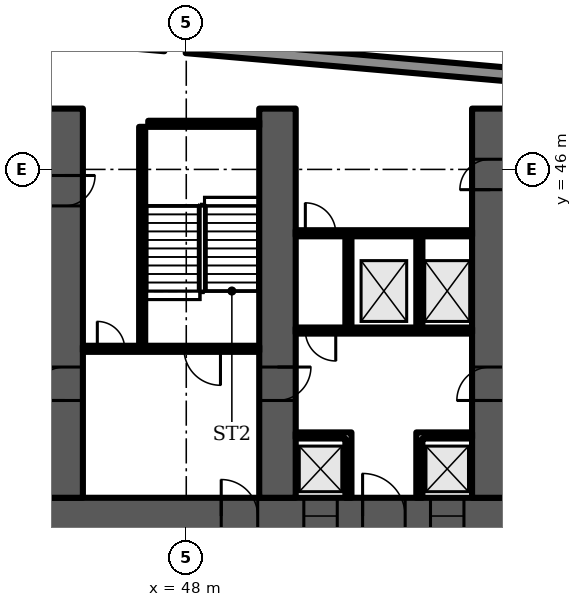
"""IFC4 building model, lengths in metres.
Left out: names, types, materials, properties, quantities, classifications, styles, units other than length and angle.
Written with IfcOpenShell. Run it as: python <this file> out.ifc"""

import sys

from ifc_helpers import new_model, si_unit, direction, frame, frame_2d, origin, place, context, subcontext, project, spatial, polyline, rectangle, outline, extrude, element, fill, save


model = new_model("IFC4")
c1 = context("Model", 3, precision=1e-05, world=origin(), true_north=direction((0.0, 1.0)))
c2 = subcontext(c1, "Body", "Model", "MODEL_VIEW")
j1 = project(units=[si_unit("LENGTHUNIT", "METRE"), si_unit("PLANEANGLEUNIT", "RADIAN")], contexts=[c1])
p1 = place(None, origin())
s1 = spatial("IfcSite", under=j1, at=p1, CompositionType="ELEMENT")
p2 = place(p1, origin())
s2 = spatial("IfcBuilding", under=s1, at=p2, CompositionType="ELEMENT")
p3 = place(p2, origin())
s3 = spatial("IfcBuildingStorey", under=s2, at=p3, CompositionType="ELEMENT", Elevation=0.0)
p4 = place(p3, frame((59.301, 49.06, 0.0), z_axis=(0.0, 0.0, 1.0), x_axis=(-0.996195, 0.087145, 0.0)))
e1 = element("IfcWall", 1, at=p4, inside=s3, PredefinedType="SOLIDWALL", context=c2, shape_type="SweptSolid", body=[
    extrude(rectangle(XDim=11.344, YDim=0.45, at=frame_2d((5.672, 0.0))), origin(), (0.0, 0.0, 1.0), 7.7),
])
p5 = place(p3, frame((9.0, 34.6, 0.0), z_axis=(0.0, 0.0, 1.0), x_axis=(1.0, 0.0, 0.0)))
e2 = element("IfcWall", 2, at=p5, inside=s3, PredefinedType="SHEAR", context=c2, shape_type="SweptSolid", body=[
    extrude(rectangle(XDim=56.0, YDim=1.2, at=frame_2d((28.0, 0.0))), origin(), (0.0, 0.0, 1.0), 7.7),
])
p6 = place(p5, frame((3.3, 0.0, 0.0)))
e3 = element("IfcOpeningElement", 3, at=p6, cuts=e2, PredefinedType="OPENING", context=c2, shape_type="SweptSolid", body=[
    extrude(rectangle(XDim=1.0, YDim=2.1, at=frame_2d((0.5, 1.05))), frame((0.0, 0.61, 0.0), z_axis=(0.0, -1.0, 0.0), x_axis=(1.0, 0.0, 0.0)), (0.0, 0.0, 1.0), 1.22),
])
p7 = place(p5, frame((7.867, 0.0, 0.0)))
e4 = element("IfcOpeningElement", 4, at=p7, cuts=e2, PredefinedType="OPENING", context=c2, shape_type="SweptSolid", body=[
    extrude(rectangle(XDim=1.1, YDim=2.1, at=frame_2d((0.55, 1.05))), frame((0.0, 0.61, 0.0), z_axis=(0.0, -1.0, 0.0), x_axis=(1.0, 0.0, 0.0)), (0.0, 0.0, 1.0), 1.22),
])
p8 = place(p5, frame((12.033, 0.0, 0.0)))
e5 = element("IfcOpeningElement", 5, at=p8, cuts=e2, PredefinedType="OPENING", context=c2, shape_type="SweptSolid", body=[
    extrude(rectangle(XDim=1.1, YDim=2.1, at=frame_2d((0.55, 1.05))), frame((0.0, 0.61, 0.0), z_axis=(0.0, -1.0, 0.0), x_axis=(1.0, 0.0, 0.0)), (0.0, 0.0, 1.0), 1.22),
])
p9 = place(p5, frame((9.8, 0.0, 0.0)))
e6 = element("IfcOpeningElement", 6, at=p9, cuts=e2, PredefinedType="OPENING", context=c2, shape_type="SweptSolid", body=[
    extrude(rectangle(XDim=1.4, YDim=2.1, at=frame_2d((0.7, 1.05))), frame((0.0, 0.61, 0.0), z_axis=(0.0, -1.0, 0.0), x_axis=(1.0, 0.0, 0.0)), (0.0, 0.0, 1.0), 1.22),
])
p10 = place(p5, frame((14.65, 0.0, 0.0)))
e7 = element("IfcOpeningElement", 7, at=p10, cuts=e2, PredefinedType="OPENING", context=c2, shape_type="SweptSolid", body=[
    extrude(rectangle(XDim=1.2, YDim=2.1, at=frame_2d((0.6, 1.05))), frame((0.0, 0.61, 0.0), z_axis=(0.0, -1.0, 0.0), x_axis=(1.0, 0.0, 0.0)), (0.0, 0.0, 1.0), 1.22),
])
p11 = place(p5, frame((21.867, 0.0, 0.0)))
e8 = element("IfcOpeningElement", 8, at=p11, cuts=e2, PredefinedType="OPENING", context=c2, shape_type="SweptSolid", body=[
    extrude(rectangle(XDim=1.1, YDim=2.1, at=frame_2d((0.55, 1.05))), frame((0.0, 0.61, 0.0), z_axis=(0.0, -1.0, 0.0), x_axis=(1.0, 0.0, 0.0)), (0.0, 0.0, 1.0), 1.22),
])
p12 = place(p5, frame((26.033, 0.0, 0.0)))
e9 = element("IfcOpeningElement", 9, at=p12, cuts=e2, PredefinedType="OPENING", context=c2, shape_type="SweptSolid", body=[
    extrude(rectangle(XDim=1.1, YDim=2.1, at=frame_2d((0.55, 1.05))), frame((0.0, 0.61, 0.0), z_axis=(0.0, -1.0, 0.0), x_axis=(1.0, 0.0, 0.0)), (0.0, 0.0, 1.0), 1.22),
])
p13 = place(p5, frame((23.8, 0.0, 0.0)))
e10 = element("IfcOpeningElement", 10, at=p13, cuts=e2, PredefinedType="OPENING", context=c2, shape_type="SweptSolid", body=[
    extrude(rectangle(XDim=1.4, YDim=2.1, at=frame_2d((0.7, 1.05))), frame((0.0, 0.61, 0.0), z_axis=(0.0, -1.0, 0.0), x_axis=(1.0, 0.0, 0.0)), (0.0, 0.0, 1.0), 1.22),
])
p14 = place(p5, frame((28.867, 0.0, 0.0)))
e11 = element("IfcOpeningElement", 11, at=p14, cuts=e2, PredefinedType="OPENING", context=c2, shape_type="SweptSolid", body=[
    extrude(rectangle(XDim=1.1, YDim=2.1, at=frame_2d((0.55, 1.05))), frame((0.0, 0.61, 0.0), z_axis=(0.0, -1.0, 0.0), x_axis=(1.0, 0.0, 0.0)), (0.0, 0.0, 1.0), 1.22),
])
p15 = place(p5, frame((33.033, 0.0, 0.0)))
e12 = element("IfcOpeningElement", 12, at=p15, cuts=e2, PredefinedType="OPENING", context=c2, shape_type="SweptSolid", body=[
    extrude(rectangle(XDim=1.1, YDim=2.1, at=frame_2d((0.55, 1.05))), frame((0.0, 0.61, 0.0), z_axis=(0.0, -1.0, 0.0), x_axis=(1.0, 0.0, 0.0)), (0.0, 0.0, 1.0), 1.22),
])
p16 = place(p5, frame((40.15, 0.0, 0.0)))
e13 = element("IfcOpeningElement", 13, at=p16, cuts=e2, PredefinedType="OPENING", context=c2, shape_type="SweptSolid", body=[
    extrude(rectangle(XDim=1.2, YDim=2.1, at=frame_2d((0.6, 1.05))), frame((0.0, 0.61, 0.0), z_axis=(0.0, -1.0, 0.0), x_axis=(1.0, 0.0, 0.0)), (0.0, 0.0, 1.0), 1.22),
])
p17 = place(p5, frame((42.867, 0.0, 0.0)))
e14 = element("IfcOpeningElement", 14, at=p17, cuts=e2, PredefinedType="OPENING", context=c2, shape_type="SweptSolid", body=[
    extrude(rectangle(XDim=1.1, YDim=2.1, at=frame_2d((0.55, 1.05))), frame((0.0, 0.61, 0.0), z_axis=(0.0, -1.0, 0.0), x_axis=(1.0, 0.0, 0.0)), (0.0, 0.0, 1.0), 1.22),
])
p18 = place(p5, frame((47.033, 0.0, 0.0)))
e15 = element("IfcOpeningElement", 15, at=p18, cuts=e2, PredefinedType="OPENING", context=c2, shape_type="SweptSolid", body=[
    extrude(rectangle(XDim=1.1, YDim=2.1, at=frame_2d((0.55, 1.05))), frame((0.0, 0.61, 0.0), z_axis=(0.0, -1.0, 0.0), x_axis=(1.0, 0.0, 0.0)), (0.0, 0.0, 1.0), 1.22),
])
p19 = place(p5, frame((44.8, 0.0, 0.0)))
e16 = element("IfcOpeningElement", 16, at=p19, cuts=e2, PredefinedType="OPENING", context=c2, shape_type="SweptSolid", body=[
    extrude(rectangle(XDim=1.4, YDim=2.1, at=frame_2d((0.7, 1.05))), frame((0.0, 0.61, 0.0), z_axis=(0.0, -1.0, 0.0), x_axis=(1.0, 0.0, 0.0)), (0.0, 0.0, 1.0), 1.22),
])
p20 = place(p5, frame((49.867, 0.0, 0.0)))
e17 = element("IfcOpeningElement", 17, at=p20, cuts=e2, PredefinedType="OPENING", context=c2, shape_type="SweptSolid", body=[
    extrude(rectangle(XDim=1.1, YDim=2.1, at=frame_2d((0.55, 1.05))), frame((0.0, 0.61, 0.0), z_axis=(0.0, -1.0, 0.0), x_axis=(1.0, 0.0, 0.0)), (0.0, 0.0, 1.0), 1.22),
])
p21 = place(p5, frame((53.5, 0.0, 0.0)))
e18 = element("IfcOpeningElement", 18, at=p21, cuts=e2, PredefinedType="OPENING", context=c2, shape_type="SweptSolid", body=[
    extrude(rectangle(XDim=1.1, YDim=2.1, at=frame_2d((0.55, 1.05))), frame((0.0, 0.61, 0.0), z_axis=(0.0, -1.0, 0.0), x_axis=(1.0, 0.0, 0.0)), (0.0, 0.0, 1.0), 1.22),
])
p22 = place(p5, frame((51.567, 0.0, 0.0)))
e19 = element("IfcOpeningElement", 19, at=p22, cuts=e2, PredefinedType="OPENING", context=c2, shape_type="SweptSolid", body=[
    extrude(rectangle(XDim=1.4, YDim=2.1, at=frame_2d((0.7, 1.05))), frame((0.0, 0.61, 0.0), z_axis=(0.0, -1.0, 0.0), x_axis=(1.0, 0.0, 0.0)), (0.0, 0.0, 1.0), 1.22),
])
p23 = place(p3, frame((44.0, 35.2, 0.0), z_axis=(0.0, 0.0, 1.0), x_axis=(0.0, 1.0, 0.0)))
e20 = element("IfcWall", 20, at=p23, inside=s3, PredefinedType="SHEAR", context=c2, shape_type="SweptSolid", body=[
    extrude(rectangle(XDim=12.8, YDim=1.2, at=frame_2d((6.4, 0.0))), origin(), (0.0, 0.0, 1.0), 7.7),
])
p24 = place(p23, frame((3.2, 0.0, 0.0)))
e21 = element("IfcOpeningElement", 21, at=p24, cuts=e20, PredefinedType="OPENING", context=c2, shape_type="SweptSolid", body=[
    extrude(rectangle(XDim=1.1, YDim=2.1, at=frame_2d((0.55, 1.05))), frame((0.0, 0.61, 0.0), z_axis=(0.0, -1.0, 0.0), x_axis=(1.0, 0.0, 0.0)), (0.0, 0.0, 1.0), 1.22),
])
p25 = place(p23, frame((9.6, 0.0, 0.0)))
e22 = element("IfcOpeningElement", 22, at=p25, cuts=e20, PredefinedType="OPENING", context=c2, shape_type="SweptSolid", body=[
    extrude(rectangle(XDim=1.0, YDim=2.1, at=frame_2d((0.5, 1.05))), frame((0.0, 0.61, 0.0), z_axis=(0.0, -1.0, 0.0), x_axis=(1.0, 0.0, 0.0)), (0.0, 0.0, 1.0), 1.22),
])
p26 = place(p3, frame((51.0, 35.2, 0.0), z_axis=(0.0, 0.0, 1.0), x_axis=(0.0, 1.0, 0.0)))
e23 = element("IfcWall", 23, at=p26, inside=s3, PredefinedType="SHEAR", context=c2, shape_type="SweptSolid", body=[
    extrude(rectangle(XDim=12.8, YDim=1.2, at=frame_2d((6.4, 0.0))), origin(), (0.0, 0.0, 1.0), 7.7),
])
p27 = place(p26, frame((3.2, 0.0, 0.0)))
e24 = element("IfcOpeningElement", 24, at=p27, cuts=e23, PredefinedType="OPENING", context=c2, shape_type="SweptSolid", body=[
    extrude(rectangle(XDim=1.1, YDim=2.1, at=frame_2d((0.55, 1.05))), frame((0.0, 0.61, 0.0), z_axis=(0.0, -1.0, 0.0), x_axis=(1.0, 0.0, 0.0)), (0.0, 0.0, 1.0), 1.22),
])
p28 = place(p3, frame((58.0, 35.2, 0.0), z_axis=(0.0, 0.0, 1.0), x_axis=(0.0, 1.0, 0.0)))
e25 = element("IfcWall", 25, at=p28, inside=s3, PredefinedType="SHEAR", context=c2, shape_type="SweptSolid", body=[
    extrude(rectangle(XDim=12.8, YDim=1.2, at=frame_2d((6.4, 0.0))), origin(), (0.0, 0.0, 1.0), 7.7),
])
p29 = place(p28, frame((10.134, 0.0, 0.0)))
e26 = element("IfcOpeningElement", 26, at=p29, cuts=e25, PredefinedType="OPENING", context=c2, shape_type="SweptSolid", body=[
    extrude(rectangle(XDim=1.0, YDim=2.1, at=frame_2d((0.5, 1.05))), frame((0.0, 0.61, 0.0), z_axis=(0.0, -1.0, 0.0), x_axis=(1.0, 0.0, 0.0)), (0.0, 0.0, 1.0), 1.22),
])
p30 = place(p28, frame((3.2, 0.0, 0.0)))
e27 = element("IfcOpeningElement", 27, at=p30, cuts=e25, PredefinedType="OPENING", context=c2, shape_type="SweptSolid", body=[
    extrude(rectangle(XDim=1.1, YDim=2.1, at=frame_2d((0.55, 1.05))), frame((0.0, 0.61, 0.0), z_axis=(0.0, -1.0, 0.0), x_axis=(1.0, 0.0, 0.0)), (0.0, 0.0, 1.0), 1.22),
])
p31 = place(p3, frame((44.6, 40.1, 0.0), z_axis=(0.0, 0.0, 1.0), x_axis=(1.0, 0.0, 0.0)))
e28 = element("IfcWall", 28, at=p31, inside=s3, PredefinedType="SHEAR", context=c2, shape_type="SweptSolid", body=[
    extrude(rectangle(XDim=5.8, YDim=0.2, at=frame_2d((2.9, 0.0))), origin(), (0.0, 0.0, 1.0), 7.7),
])
p32 = place(p31, frame((3.325, 0.0, 0.0)))
e29 = element("IfcOpeningElement", 29, at=p32, cuts=e28, PredefinedType="OPENING", context=c2, shape_type="SweptSolid", body=[
    extrude(rectangle(XDim=1.2, YDim=2.1, at=frame_2d((0.6, 1.05))), frame((0.0, 0.11, 0.0), z_axis=(0.0, -1.0, 0.0), x_axis=(1.0, 0.0, 0.0)), (0.0, 0.0, 1.0), 0.22),
])
p33 = place(p31, frame((0.475, 0.0, 0.0)))
e30 = element("IfcOpeningElement", 30, at=p33, cuts=e28, PredefinedType="OPENING", context=c2, shape_type="SweptSolid", body=[
    extrude(rectangle(XDim=0.9, YDim=2.1, at=frame_2d((0.45, 1.05))), frame((0.0, 0.11, 0.0), z_axis=(0.0, -1.0, 0.0), x_axis=(1.0, 0.0, 0.0)), (0.0, 0.0, 1.0), 0.22),
])
p34 = place(p3, frame((46.55, 40.2, 0.0), z_axis=(0.0, 0.0, 1.0), x_axis=(0.0, 1.0, 0.0)))
e31 = element("IfcWall", 31, at=p34, inside=s3, PredefinedType="SHEAR", context=c2, shape_type="SweptSolid", body=[
    extrude(rectangle(XDim=7.2, YDim=0.2, at=frame_2d((3.6, 0.0))), origin(), (0.0, 0.0, 1.0), 7.7),
])
p35 = place(p3, frame((46.75, 47.5, 0.0), z_axis=(0.0, 0.0, 1.0), x_axis=(1.0, 0.0, 0.0)))
e32 = element("IfcWall", 32, at=p35, inside=s3, PredefinedType="SHEAR", context=c2, shape_type="SweptSolid", body=[
    extrude(rectangle(XDim=3.65, YDim=0.2, at=frame_2d((1.825, 0.0))), origin(), (0.0, 0.0, 1.0), 7.7),
])
p36 = place(p3, frame((51.6, 40.7, 0.0), z_axis=(0.0, 0.0, 1.0), x_axis=(1.0, 0.0, 0.0)))
e33 = element("IfcWall", 33, at=p36, inside=s3, PredefinedType="PARTITIONING", context=c2, shape_type="SweptSolid", body=[
    extrude(rectangle(XDim=5.8, YDim=0.2, at=frame_2d((2.9, 0.0))), origin(), (0.0, 0.0, 1.0), 7.7),
])
p37 = place(p36, frame((0.317, 0.0, 0.0)))
e34 = element("IfcOpeningElement", 34, at=p37, cuts=e33, PredefinedType="OPENING", context=c2, shape_type="SweptSolid", body=[
    extrude(rectangle(XDim=1.0, YDim=2.1, at=frame_2d((0.5, 1.05))), frame((0.0, 0.11, 0.0), z_axis=(0.0, -1.0, 0.0), x_axis=(1.0, 0.0, 0.0)), (0.0, 0.0, 1.0), 0.22),
])
p38 = place(p36, frame((2.35, 0.0, 0.0)))
e35 = element("IfcOpeningElement", 35, at=p38, cuts=e33, PredefinedType="OPENING", context=c2, shape_type="SweptSolid", body=[
    extrude(rectangle(XDim=1.1, YDim=2.1, at=frame_2d((0.55, 1.05))), frame((0.0, 0.11, 0.0), z_axis=(0.0, -1.0, 0.0), x_axis=(1.0, 0.0, 0.0)), (0.0, 0.0, 1.0), 0.22),
])
p39 = place(p36, frame((4.433, 0.0, 0.0)))
e36 = element("IfcOpeningElement", 36, at=p39, cuts=e33, PredefinedType="OPENING", context=c2, shape_type="SweptSolid", body=[
    extrude(rectangle(XDim=1.1, YDim=2.1, at=frame_2d((0.55, 1.05))), frame((0.0, 0.11, 0.0), z_axis=(0.0, -1.0, 0.0), x_axis=(1.0, 0.0, 0.0)), (0.0, 0.0, 1.0), 0.22),
])
p40 = place(p3, frame((51.6, 43.9, 0.0), z_axis=(0.0, 0.0, 1.0), x_axis=(1.0, 0.0, 0.0)))
e37 = element("IfcWall", 37, at=p40, inside=s3, PredefinedType="PARTITIONING", context=c2, shape_type="SweptSolid", body=[
    extrude(rectangle(XDim=5.8, YDim=0.2, at=frame_2d((2.9, 0.0))), origin(), (0.0, 0.0, 1.0), 7.7),
])
p41 = place(p40, frame((0.317, 0.0, 0.0)))
e38 = element("IfcOpeningElement", 38, at=p41, cuts=e37, PredefinedType="OPENING", context=c2, shape_type="SweptSolid", body=[
    extrude(rectangle(XDim=1.0, YDim=2.1, at=frame_2d((0.5, 1.05))), frame((0.0, 0.11, 0.0), z_axis=(0.0, -1.0, 0.0), x_axis=(1.0, 0.0, 0.0)), (0.0, 0.0, 1.0), 0.22),
])
p42 = place(p3, frame((0.0, 0.0, -0.0)))
e39 = element("IfcWall", 39, at=p42, inside=s3, PredefinedType="PARTITIONING", context=c2, shape_type="SweptSolid", body=[
    extrude(outline(polyline([(53.233, 37.15), (51.6, 37.15), (51.6, 37.35), (53.233, 37.35), (53.433, 37.35), (53.433, 35.2), (53.233, 35.2), (53.233, 37.15)])), origin(), (0.0, 0.0, 1.0), 7.7),
])
p43 = place(p3, frame((0.0, 0.0, -0.0)))
e40 = element("IfcWall", 40, at=p43, inside=s3, PredefinedType="PARTITIONING", context=c2, shape_type="SweptSolid", body=[
    extrude(outline(polyline([(55.567, 37.35), (55.767, 37.35), (57.4, 37.35), (57.4, 37.15), (55.767, 37.15), (55.767, 35.2), (55.567, 35.2), (55.567, 37.35)])), origin(), (0.0, 0.0, 1.0), 7.7),
])
p44 = place(p3, frame((0.0, 0.0, -0.0)))
e41 = element("IfcWall", 41, at=p44, inside=s3, PredefinedType="PARTITIONING", context=c2, shape_type="SweptSolid", body=[
    extrude(outline(polyline([(53.233, 40.8), (53.233, 43.8), (53.433, 43.8), (53.433, 40.8), (53.233, 40.8)])), origin(), (0.0, 0.0, 1.0), 7.7),
])
p45 = place(p3, frame((0.0, 0.0, -0.0)))
e42 = element("IfcWall", 42, at=p45, inside=s3, PredefinedType="PARTITIONING", context=c2, shape_type="SweptSolid", body=[
    extrude(outline(polyline([(55.567, 40.8), (55.567, 43.8), (55.767, 43.8), (55.767, 40.8), (55.567, 40.8)])), origin(), (0.0, 0.0, 1.0), 7.7),
])
p46 = place(p32, origin())
e43 = element("IfcDoor", 43, at=p46, inside=s3, OperationType="SINGLE_SWING_RIGHT", PredefinedType="DOOR", context=c2, shape_type="SweptSolid", body=[
    extrude(rectangle(XDim=1.2, YDim=2.1, at=frame_2d((0.6, 1.05))), frame((0.0, 0.025, 0.0), z_axis=(0.0, -1.0, 0.0), x_axis=(1.0, 0.0, 0.0)), (0.0, 0.0, 1.0), 0.05),
])
fill(e29, e43)
p47 = place(p33, origin())
e44 = element("IfcDoor", 44, at=p47, inside=s3, OperationType="SINGLE_SWING_LEFT", PredefinedType="DOOR", context=c2, shape_type="SweptSolid", body=[
    extrude(rectangle(XDim=0.9, YDim=2.1, at=frame_2d((0.45, 1.05))), frame((0.0, 0.025, 0.0), z_axis=(0.0, -1.0, 0.0), x_axis=(1.0, 0.0, 0.0)), (0.0, 0.0, 1.0), 0.05),
])
fill(e30, e44)
p48 = place(p16, origin())
e45 = element("IfcDoor", 45, at=p48, inside=s3, OperationType="SINGLE_SWING_LEFT", PredefinedType="DOOR", context=c2, shape_type="SweptSolid", body=[
    extrude(rectangle(XDim=1.2, YDim=2.1, at=frame_2d((0.6, 1.05))), frame((0.0, 0.025, 0.0), z_axis=(0.0, -1.0, 0.0), x_axis=(1.0, 0.0, 0.0)), (0.0, 0.0, 1.0), 0.05),
])
fill(e13, e45)
p49 = place(p17, origin())
e46 = element("IfcDoor", 46, at=p49, inside=s3, OperationType="DOUBLE_DOOR_SLIDING", PredefinedType="DOOR", context=c2, shape_type="SweptSolid", body=[
    extrude(rectangle(XDim=1.1, YDim=2.1, at=frame_2d((0.55, 1.05))), frame((0.0, 0.025, 0.0), z_axis=(0.0, -1.0, 0.0), x_axis=(1.0, 0.0, 0.0)), (0.0, 0.0, 1.0), 0.05),
])
fill(e14, e46)
p50 = place(p18, origin())
e47 = element("IfcDoor", 47, at=p50, inside=s3, OperationType="DOUBLE_DOOR_SLIDING", PredefinedType="DOOR", context=c2, shape_type="SweptSolid", body=[
    extrude(rectangle(XDim=1.1, YDim=2.1, at=frame_2d((0.55, 1.05))), frame((0.0, 0.025, 0.0), z_axis=(0.0, -1.0, 0.0), x_axis=(1.0, 0.0, 0.0)), (0.0, 0.0, 1.0), 0.05),
])
fill(e15, e47)
p51 = place(p19, origin())
e48 = element("IfcDoor", 48, at=p51, inside=s3, OperationType="DOUBLE_DOOR_SINGLE_SWING", PredefinedType="DOOR", context=c2, shape_type="SweptSolid", body=[
    extrude(rectangle(XDim=1.4, YDim=2.1, at=frame_2d((0.7, 1.05))), frame((0.0, 0.025, 0.0), z_axis=(0.0, -1.0, 0.0), x_axis=(1.0, 0.0, 0.0)), (0.0, 0.0, 1.0), 0.05),
])
fill(e16, e48)
p52 = place(p37, origin())
e49 = element("IfcDoor", 49, at=p52, inside=s3, OperationType="SINGLE_SWING_RIGHT", PredefinedType="DOOR", context=c2, shape_type="SweptSolid", body=[
    extrude(rectangle(XDim=1.0, YDim=2.1, at=frame_2d((0.5, 1.05))), frame((0.0, 0.025, 0.0), z_axis=(0.0, -1.0, 0.0), x_axis=(1.0, 0.0, 0.0)), (0.0, 0.0, 1.0), 0.05),
])
fill(e34, e49)
p53 = place(p38, origin())
e50 = element("IfcDoor", 50, at=p53, inside=s3, OperationType="DOUBLE_DOOR_SLIDING", PredefinedType="DOOR", context=c2, shape_type="SweptSolid", body=[
    extrude(rectangle(XDim=1.1, YDim=2.1, at=frame_2d((0.55, 1.05))), frame((0.0, 0.025, 0.0), z_axis=(0.0, -1.0, 0.0), x_axis=(1.0, 0.0, 0.0)), (0.0, 0.0, 1.0), 0.05),
])
fill(e35, e50)
p54 = place(p39, origin())
e51 = element("IfcDoor", 51, at=p54, inside=s3, OperationType="DOUBLE_DOOR_SLIDING", PredefinedType="DOOR", context=c2, shape_type="SweptSolid", body=[
    extrude(rectangle(XDim=1.1, YDim=2.1, at=frame_2d((0.55, 1.05))), frame((0.0, 0.025, 0.0), z_axis=(0.0, -1.0, 0.0), x_axis=(1.0, 0.0, 0.0)), (0.0, 0.0, 1.0), 0.05),
])
fill(e36, e51)
p55 = place(p41, origin())
e52 = element("IfcDoor", 52, at=p55, inside=s3, OperationType="SINGLE_SWING_LEFT", PredefinedType="DOOR", context=c2, shape_type="SweptSolid", body=[
    extrude(rectangle(XDim=1.0, YDim=2.1, at=frame_2d((0.5, 1.05))), frame((0.0, 0.025, 0.0), z_axis=(0.0, -1.0, 0.0), x_axis=(1.0, 0.0, 0.0)), (0.0, 0.0, 1.0), 0.05),
])
fill(e38, e52)
p56 = place(p29, origin())
e53 = element("IfcDoor", 53, at=p56, inside=s3, OperationType="SINGLE_SWING_LEFT", PredefinedType="DOOR", context=c2, shape_type="SweptSolid", body=[
    extrude(rectangle(XDim=1.0, YDim=2.1, at=frame_2d((0.5, 1.05))), frame((0.0, 0.6, 0.0), z_axis=(0.0, -1.0, 0.0), x_axis=(1.0, 0.0, 0.0)), (0.0, 0.0, 1.0), 1.199),
])
fill(e26, e53)
p57 = place(p24, origin())
e54 = element("IfcDoor", 54, at=p57, inside=s3, OperationType="SINGLE_SWING_LEFT", PredefinedType="DOOR", context=c2, shape_type="SweptSolid", body=[
    extrude(rectangle(XDim=1.1, YDim=2.1, at=frame_2d((0.55, 1.05))), frame((0.0, 0.025, 0.0), z_axis=(0.0, -1.0, 0.0), x_axis=(1.0, 0.0, 0.0)), (0.0, 0.0, 1.0), 0.05),
])
fill(e21, e54)
p58 = place(p25, origin())
e55 = element("IfcDoor", 55, at=p58, inside=s3, OperationType="SINGLE_SWING_RIGHT", PredefinedType="DOOR", context=c2, shape_type="SweptSolid", body=[
    extrude(rectangle(XDim=1.0, YDim=2.1, at=frame_2d((0.5, 1.05))), frame((0.0, 0.6, 0.0), z_axis=(0.0, -1.0, 0.0), x_axis=(1.0, 0.0, 0.0)), (0.0, 0.0, 1.0), 1.199),
])
fill(e22, e55)
p59 = place(p27, origin())
e56 = element("IfcDoor", 56, at=p59, inside=s3, OperationType="SINGLE_SWING_RIGHT", PredefinedType="DOOR", context=c2, shape_type="SweptSolid", body=[
    extrude(rectangle(XDim=1.1, YDim=2.1, at=frame_2d((0.55, 1.05))), frame((0.0, 0.025, 0.0), z_axis=(0.0, -1.0, 0.0), x_axis=(1.0, 0.0, 0.0)), (0.0, 0.0, 1.0), 0.05),
])
fill(e24, e56)
p60 = place(p30, origin())
e57 = element("IfcDoor", 57, at=p60, inside=s3, OperationType="SINGLE_SWING_LEFT", PredefinedType="DOOR", context=c2, shape_type="SweptSolid", body=[
    extrude(rectangle(XDim=1.1, YDim=2.1, at=frame_2d((0.55, 1.05))), frame((0.0, 0.025, 0.0), z_axis=(0.0, -1.0, 0.0), x_axis=(1.0, 0.0, 0.0)), (0.0, 0.0, 1.0), 0.05),
])
fill(e27, e57)
save(model, sys.argv[1])
